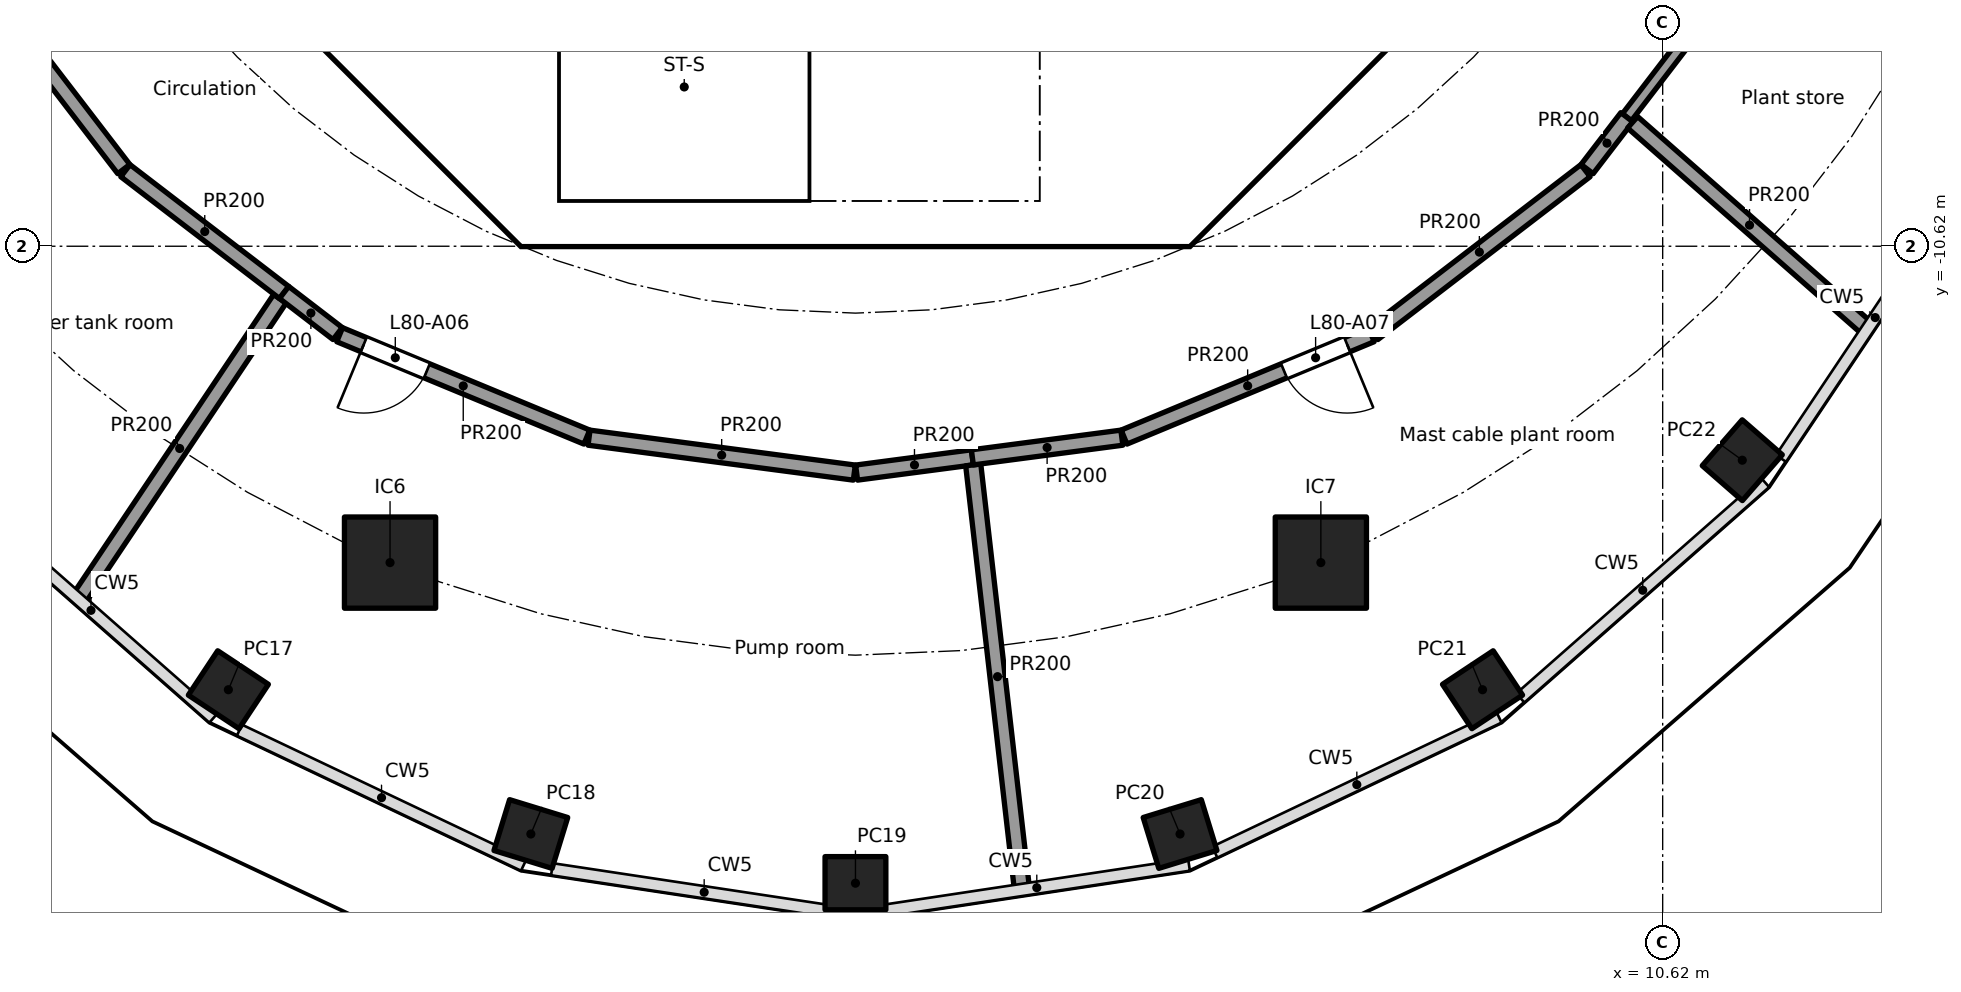
"""IFC4 building model, lengths in metres.
Left out: names, types, materials, properties, quantities, classifications, styles, units other than length and angle.
Written with IfcOpenShell. Run it as: python <this file> out.ifc"""

import sys

from ifc_helpers import new_model, si_unit, direction, frame, frame_2d, origin, origin_2d, place, context, subcontext, project, spatial, polyline, rectangle, hollow_rectangle, outline, extrude, element, fill, save


model = new_model("IFC4")
c1 = context("Model", 3, precision=1e-05, world=origin(), true_north=direction((0.0, 1.0)))
c2 = subcontext(c1, "Body", "Model", "MODEL_VIEW")
j1 = project(units=[si_unit("LENGTHUNIT", "METRE"), si_unit("PLANEANGLEUNIT", "RADIAN")], contexts=[c1])
p1 = place(None, origin())
s1 = spatial("IfcSite", under=j1, at=p1, CompositionType="ELEMENT")
p2 = place(p1, origin())
s2 = spatial("IfcBuilding", under=s1, at=p2, CompositionType="ELEMENT")
p3 = place(p2, frame((0.0, 0.0, 324.9)))
s3 = spatial("IfcBuildingStorey", under=s2, at=p3, CompositionType="ELEMENT", Elevation=324.9)
for number, where, z_axis, x_axis in (
    (1, (-8.25, -16.455, 0.0), (0.0, 0.0, 1.0), (0.834, -0.552, 0.0)),
    (2, (-4.271, -18.353, 0.0), (0.0, 0.0, 1.0), (0.956, -0.294, 0.0)),
    (3, (0.0, -19.0, 0.0), (0.0, 0.0, 1.0), (1.0, 0.0, 0.0)),
    (4, (4.271, -18.353, 0.0), (0.0, 0.0, 1.0), (0.956, 0.294, 0.0)),
    (5, (8.25, -16.455, 0.0), (0.0, 0.0, 1.0), (0.834, 0.552, 0.0)),
    (6, (11.667, -13.435, 0.0), (0.0, 0.0, 1.0), (0.657, 0.754, 0.0)),
):
    element("IfcColumn", number, at=place(p3, frame(where, z_axis=z_axis, x_axis=x_axis)), inside=s3, PredefinedType="COLUMN", context=c2, shape_type="SweptSolid", body=[
        extrude(hollow_rectangle(XDim=0.8, YDim=0.7, WallThickness=0.025, at=origin_2d()), origin(), (0.0, 0.0, 1.0), 4.0),
    ])
for number, where, z_axis, x_axis in (
    (7, (-6.123, -14.782, 0.0), (0.0, 0.0, 1.0), (1.0, 0.0, 0.0)),
    (8, (6.123, -14.782, 0.0), (0.0, 0.0, 1.0), (1.0, 0.0, 0.0)),
):
    element("IfcColumn", number, at=place(p3, frame(where, z_axis=z_axis, x_axis=x_axis)), inside=s3, PredefinedType="COLUMN", context=c2, shape_type="SweptSolid", body=[
        extrude(rectangle(XDim=1.2, YDim=1.2, at=origin_2d()), origin(), (0.0, 0.0, 1.0), 4.0),
    ])
p4 = place(p3, frame((-9.988, -4.613, 0.0), z_axis=(0.0, 0.0, 1.0), x_axis=(0.707106781187, -0.707106781187, 0.0)))
e9 = element("IfcWall", 9, at=p4, inside=s3, PredefinedType="SHEAR", context=c2, shape_type="SweptSolid", body=[
    extrude(rectangle(XDim=7.602, YDim=0.6, at=frame_2d((3.801, 0.0))), origin(), (0.0, 0.0, 1.0), 3.7),
])
p5 = place(p4, frame((6.151, 0.0, 0.0)))
e10 = element("IfcOpeningElement", 10, at=p5, cuts=e9, PredefinedType="OPENING", context=c2, shape_type="SweptSolid", body=[
    extrude(rectangle(XDim=1.1, YDim=2.1, at=frame_2d((0.55, 1.05))), frame((0.0, 0.31, 0.0), z_axis=(0.0, -1.0, 0.0), x_axis=(1.0, 0.0, 0.0)), (0.0, 0.0, 1.0), 0.62),
])
p6 = place(p3, frame((4.613, -9.988, 0.0), z_axis=(0.0, 0.0, 1.0), x_axis=(0.707106781187, 0.707106781187, 0.0)))
e11 = element("IfcWall", 11, at=p6, inside=s3, PredefinedType="SHEAR", context=c2, shape_type="SweptSolid", body=[
    extrude(rectangle(XDim=7.602, YDim=0.6, at=frame_2d((3.801, 0.0))), origin(), (0.0, 0.0, 1.0), 3.7),
])
p7 = place(p6, frame((3.201, 0.0, 0.0)))
e12 = element("IfcOpeningElement", 12, at=p7, cuts=e11, PredefinedType="OPENING", context=c2, shape_type="SweptSolid", body=[
    extrude(rectangle(XDim=1.2, YDim=2.1, at=frame_2d((0.6, 1.05))), frame((0.0, 0.31, 0.0), z_axis=(0.0, -1.0, 0.0), x_axis=(1.0, 0.0, 0.0)), (0.0, 0.0, 1.0), 0.62),
])
p8 = place(p3, frame((4.0, -10.025, 0.0), z_axis=(0.0, 0.0, 1.0), x_axis=(0.0, 1.0, 0.0)))
e13 = element("IfcWall", 13, at=p8, inside=s3, PredefinedType="SOLIDWALL", context=c2, shape_type="SweptSolid", body=[
    extrude(rectangle(XDim=3.0, YDim=0.2, at=frame_2d((1.5, 0.0))), origin(), (0.0, 0.0, 1.0), 3.7),
])
p9 = place(p8, frame((0.975, 0.0, 0.0)))
e14 = element("IfcOpeningElement", 14, at=p9, cuts=e13, PredefinedType="OPENING", context=c2, shape_type="SweptSolid", body=[
    extrude(rectangle(XDim=1.1, YDim=2.1, at=frame_2d((0.55, 1.05))), frame((0.0, 0.11, 0.0), z_axis=(0.0, -1.0, 0.0), x_axis=(1.0, 0.0, 0.0)), (0.0, 0.0, 1.0), 0.22),
])
p10 = place(p3, frame((-5.8, -8.227, 0.0), z_axis=(0.0, 0.0, 1.0), x_axis=(0.0, 1.0, 0.0)))
e15 = element("IfcWall", 15, at=p10, inside=s3, PredefinedType="PARTITIONING", context=c2, shape_type="SweptSolid", body=[
    extrude(rectangle(XDim=3.927, YDim=0.15, at=frame_2d((1.963, 0.0))), origin(), (0.0, 0.0, 1.0), 3.7),
])
p11 = place(p10, frame((2.764, 0.0, 0.0)))
e16 = element("IfcOpeningElement", 16, at=p11, cuts=e15, PredefinedType="OPENING", context=c2, shape_type="SweptSolid", body=[
    extrude(rectangle(XDim=0.9, YDim=2.1, at=frame_2d((0.45, 1.05))), frame((0.0, 0.085, 0.0), z_axis=(0.0, -1.0, 0.0), x_axis=(1.0, 0.0, 0.0)), (0.0, 0.0, 1.0), 0.17),
])
p12 = place(p10, frame((0.688, 0.0, 0.0)))
e17 = element("IfcOpeningElement", 17, at=p12, cuts=e15, PredefinedType="OPENING", context=c2, shape_type="SweptSolid", body=[
    extrude(rectangle(XDim=0.9, YDim=2.1, at=frame_2d((0.45, 1.05))), frame((0.0, 0.085, 0.0), z_axis=(0.0, -1.0, 0.0), x_axis=(1.0, 0.0, 0.0)), (0.0, 0.0, 1.0), 0.17),
])
p13 = place(p3, origin())
e18 = element("IfcWall", 18, at=p13, inside=s3, PredefinedType="SHEAR", context=c2, shape_type="SweptSolid", body=[
    extrude(outline(polyline([(-4.152, -10.025), (4.152, -10.025), (4.401, -9.776), (4.825, -10.2), (4.401, -10.625), (-4.401, -10.625), (-4.825, -10.2), (-4.401, -9.776), (-4.152, -10.025)])), origin(), (0.0, 0.0, 1.0), 3.7),
])
p14 = place(p3, origin())
e19 = element("IfcWall", 19, at=p14, inside=s3, PredefinedType="SOLIDWALL", context=c2, shape_type="SweptSolid", body=[
    extrude(outline(polyline([(-3.9, -10.025), (-4.1, -10.025), (-4.1, -7.025), (-3.9, -7.025), (-3.9, -10.025)])), origin(), (0.0, 0.0, 1.0), 3.7),
])
p15 = place(p3, frame((11.771, -6.809, 0.0), z_axis=(0.0, 0.0, 1.0), x_axis=(-0.608731606531, -0.793376222993, 0.0)))
e20 = element("IfcWall", 20, at=p15, inside=s3, PredefinedType="PARTITIONING", context=c2, shape_type="SweptSolid", body=[
    extrude(rectangle(XDim=2.664, YDim=0.15, at=frame_2d((1.332, 0.0))), origin(), (0.0, 0.0, 1.0), 3.7),
])
p16 = place(p3, frame((-9.626, -9.605, 0.0), z_axis=(0.0, 0.0, 1.0), x_axis=(-0.608697977542, 0.793402024283, 0.0)))
e21 = element("IfcWall", 21, at=p16, inside=s3, PredefinedType="PARTITIONING", context=c2, shape_type="SweptSolid", body=[
    extrude(rectangle(XDim=3.52, YDim=0.2, at=frame_2d((1.76, 0.0))), origin(), (0.0, 0.0, 1.0), 3.7),
])
p17 = place(p3, frame((-7.572, -11.311, 0.0), z_axis=(0.0, 0.0, 1.0), x_axis=(-0.55629198168, -0.830986901893, 0.0)))
e22 = element("IfcWall", 22, at=p17, inside=s3, PredefinedType="PARTITIONING", context=c2, shape_type="SweptSolid", body=[
    extrude(rectangle(XDim=4.74, YDim=0.2, at=frame_2d((2.37, 0.0))), origin(), (0.0, 0.0, 1.0), 3.7),
])
p18 = place(p3, frame((-7.517, -11.228, 0.0), z_axis=(0.0, 0.0, 1.0), x_axis=(-0.793395797287, 0.608706093979, 0.0)))
e23 = element("IfcWall", 23, at=p18, inside=s3, PredefinedType="PARTITIONING", context=c2, shape_type="SweptSolid", body=[
    extrude(rectangle(XDim=2.632, YDim=0.2, at=frame_2d((1.316, 0.0))), origin(), (0.0, 0.0, 1.0), 3.7),
])
p19 = place(p3, frame((-6.812, -11.769, 0.0), z_axis=(0.0, 0.0, 1.0), x_axis=(-0.793420478802, 0.608673922407, 0.0)))
e24 = element("IfcWall", 24, at=p19, inside=s3, PredefinedType="PARTITIONING", context=c2, shape_type="SweptSolid", body=[
    extrude(rectangle(XDim=0.888, YDim=0.2, at=frame_2d((0.444, 0.0))), origin(), (0.0, 0.0, 1.0), 3.7),
])
p20 = place(p3, frame((-3.534, -13.131, 0.0), z_axis=(0.0, 0.0, 1.0), x_axis=(-0.92386297064, 0.382723413813, 0.0)))
e25 = element("IfcWall", 25, at=p20, inside=s3, PredefinedType="PARTITIONING", context=c2, shape_type="SweptSolid", body=[
    extrude(rectangle(XDim=3.52, YDim=0.2, at=frame_2d((1.76, 0.0))), origin(), (0.0, 0.0, 1.0), 3.7),
])
p21 = place(p20, frame((2.278, 0.0, 0.0)))
e26 = element("IfcOpeningElement", 26, at=p21, cuts=e25, PredefinedType="OPENING", context=c2, shape_type="SweptSolid", body=[
    extrude(rectangle(XDim=0.9, YDim=2.1, at=frame_2d((0.45, 1.05))), frame((0.0, 0.11, 0.0), z_axis=(0.0, -1.0, 0.0), x_axis=(1.0, 0.0, 0.0)), (0.0, 0.0, 1.0), 0.22),
])
p22 = place(p3, frame((-0.015, -13.598, 0.0), z_axis=(0.0, 0.0, 1.0), x_axis=(-0.991452406768, 0.130468866457, 0.0)))
e27 = element("IfcWall", 27, at=p22, inside=s3, PredefinedType="PARTITIONING", context=c2, shape_type="SweptSolid", body=[
    extrude(rectangle(XDim=3.52, YDim=0.2, at=frame_2d((1.76, 0.0))), origin(), (0.0, 0.0, 1.0), 3.7),
])
p23 = place(p3, frame((1.538, -13.397, 0.0), z_axis=(0.0, 0.0, 1.0), x_axis=(-0.991449967232, -0.13048740351, 0.0)))
e28 = element("IfcWall", 28, at=p23, inside=s3, PredefinedType="PARTITIONING", context=c2, shape_type="SweptSolid", body=[
    extrude(rectangle(XDim=1.536, YDim=0.2, at=frame_2d((0.768, 0.0))), origin(), (0.0, 0.0, 1.0), 3.7),
])
p24 = place(p3, frame((1.55, -13.497, 0.0), z_axis=(0.0, 0.0, 1.0), x_axis=(0.114057329834, -0.993474169524, 0.0)))
e29 = element("IfcWall", 29, at=p24, inside=s3, PredefinedType="PARTITIONING", context=c2, shape_type="SweptSolid", body=[
    extrude(rectangle(XDim=5.608, YDim=0.2, at=frame_2d((2.804, 0.0))), origin(), (0.0, 0.0, 1.0), 3.7),
])
p25 = place(p3, frame((3.505, -13.139, 0.0), z_axis=(0.0, 0.0, 1.0), x_axis=(-0.991454295543, -0.130454512571, 0.0)))
e30 = element("IfcWall", 30, at=p25, inside=s3, PredefinedType="PARTITIONING", context=c2, shape_type="SweptSolid", body=[
    extrude(rectangle(XDim=1.984, YDim=0.2, at=frame_2d((0.992, 0.0))), origin(), (0.0, 0.0, 1.0), 3.7),
])
p26 = place(p3, frame((6.786, -11.784, 0.0), z_axis=(0.0, 0.0, 1.0), x_axis=(-0.92386297064, -0.382723413813, 0.0)))
e31 = element("IfcWall", 31, at=p26, inside=s3, PredefinedType="PARTITIONING", context=c2, shape_type="SweptSolid", body=[
    extrude(rectangle(XDim=3.52, YDim=0.2, at=frame_2d((1.76, 0.0))), origin(), (0.0, 0.0, 1.0), 3.7),
])
p27 = place(p26, frame((0.342, 0.0, 0.0)))
e32 = element("IfcOpeningElement", 32, at=p27, cuts=e31, PredefinedType="OPENING", context=c2, shape_type="SweptSolid", body=[
    extrude(rectangle(XDim=0.9, YDim=2.1, at=frame_2d((0.45, 1.05))), frame((0.0, 0.11, 0.0), z_axis=(0.0, -1.0, 0.0), x_axis=(1.0, 0.0, 0.0)), (0.0, 0.0, 1.0), 0.22),
])
p28 = place(p3, frame((9.605, -9.626, 0.0), z_axis=(0.0, 0.0, 1.0), x_axis=(-0.793402024283, -0.608697977542, 0.0)))
e33 = element("IfcWall", 33, at=p28, inside=s3, PredefinedType="PARTITIONING", context=c2, shape_type="SweptSolid", body=[
    extrude(rectangle(XDim=3.52, YDim=0.2, at=frame_2d((1.76, 0.0))), origin(), (0.0, 0.0, 1.0), 3.7),
])
p29 = place(p3, frame((10.149, -8.923, 0.0), z_axis=(0.0, 0.0, 1.0), x_axis=(-0.608694005511, -0.793405071609, 0.0)))
e34 = element("IfcWall", 34, at=p29, inside=s3, PredefinedType="PARTITIONING", context=c2, shape_type="SweptSolid", body=[
    extrude(rectangle(XDim=0.859, YDim=0.2, at=frame_2d((0.43, 0.0))), origin(), (0.0, 0.0, 1.0), 3.7),
])
p30 = place(p3, frame((13.301, -11.695, 0.0), z_axis=(0.0, 0.0, 1.0), x_axis=(-0.750994766266, 0.660308156122, 0.0)))
e35 = element("IfcWall", 35, at=p30, inside=s3, PredefinedType="PARTITIONING", context=c2, shape_type="SweptSolid", body=[
    extrude(rectangle(XDim=4.097, YDim=0.2, at=frame_2d((2.049, 0.0))), origin(), (0.0, 0.0, 1.0), 3.7),
])
p31 = place(p9, origin())
e36 = element("IfcDoor", 36, at=p31, inside=s3, OperationType="SINGLE_SWING_LEFT", PredefinedType="DOOR", context=c2, shape_type="SweptSolid", body=[
    extrude(rectangle(XDim=1.1, YDim=2.1, at=frame_2d((0.55, 1.05))), frame((0.0, 0.025, 0.0), z_axis=(0.0, -1.0, 0.0), x_axis=(1.0, 0.0, 0.0)), (0.0, 0.0, 1.0), 0.05),
])
fill(e14, e36)
p32 = place(p5, origin())
e37 = element("IfcDoor", 37, at=p32, inside=s3, OperationType="SINGLE_SWING_LEFT", PredefinedType="DOOR", context=c2, shape_type="SweptSolid", body=[
    extrude(rectangle(XDim=1.1, YDim=2.1, at=frame_2d((0.55, 1.05))), frame((0.0, 0.025, 0.0), z_axis=(0.0, -1.0, 0.0), x_axis=(1.0, 0.0, 0.0)), (0.0, 0.0, 1.0), 0.05),
])
fill(e10, e37)
p33 = place(p21, origin())
e38 = element("IfcDoor", 38, at=p33, inside=s3, OperationType="SINGLE_SWING_RIGHT", PredefinedType="DOOR", context=c2, shape_type="SweptSolid", body=[
    extrude(rectangle(XDim=0.9, YDim=2.1, at=frame_2d((0.45, 1.05))), frame((0.0, 0.025, 0.0), z_axis=(0.0, -1.0, 0.0), x_axis=(1.0, 0.0, 0.0)), (0.0, 0.0, 1.0), 0.05),
])
fill(e26, e38)
p34 = place(p27, origin())
e39 = element("IfcDoor", 39, at=p34, inside=s3, OperationType="SINGLE_SWING_LEFT", PredefinedType="DOOR", context=c2, shape_type="SweptSolid", body=[
    extrude(rectangle(XDim=0.9, YDim=2.1, at=frame_2d((0.45, 1.05))), frame((0.0, 0.025, 0.0), z_axis=(0.0, -1.0, 0.0), x_axis=(1.0, 0.0, 0.0)), (0.0, 0.0, 1.0), 0.05),
])
fill(e32, e39)
save(model, sys.argv[1])
